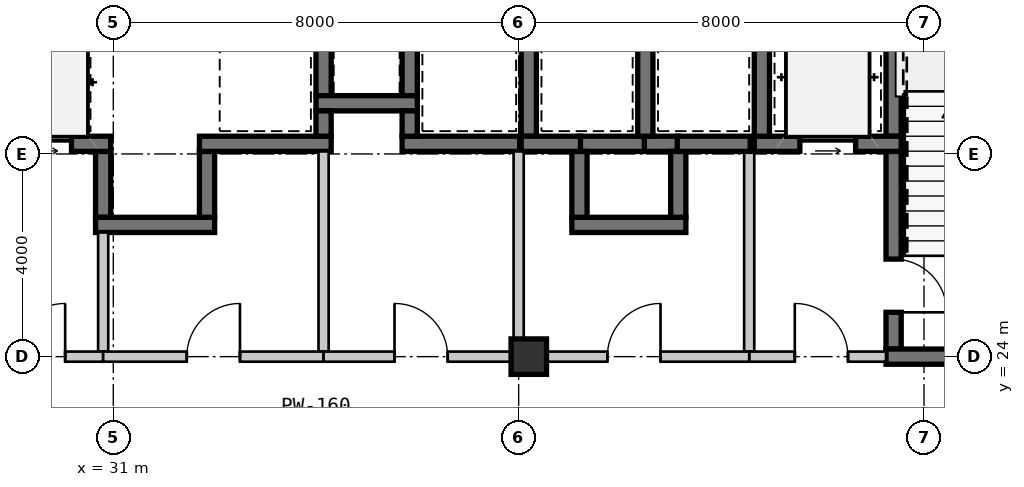
"""IFC4 building model, lengths in metres.
Left out: names, types, materials, properties, quantities, classifications, styles, units other than length and angle.
Written with IfcOpenShell. Run it as: python <this file> out.ifc"""

import sys

from ifc_helpers import new_model, si_unit, direction, frame, frame_2d, origin, origin_2d, place, context, subcontext, project, spatial, rectangle, extrude, source, transform, mapped, element, fill, save


model = new_model("IFC4")
c1 = context("Model", 3, precision=1e-05, world=origin(), true_north=direction((0.0, 1.0)))
c2 = subcontext(c1, "Body", "Model", "MODEL_VIEW")
j1 = project(units=[si_unit("LENGTHUNIT", "METRE"), si_unit("PLANEANGLEUNIT", "RADIAN")], contexts=[c1])
p1 = place(None, origin())
s1 = spatial("IfcSite", under=j1, at=p1, CompositionType="ELEMENT")
p2 = place(p1, origin())
s2 = spatial("IfcBuilding", under=s1, at=p2, CompositionType="ELEMENT")
p3 = place(p2, frame((0.0, 0.0, 93.45)))
s3 = spatial("IfcBuildingStorey", under=s2, at=p3, CompositionType="ELEMENT", Elevation=93.45)
m1 = source(origin(), c2, "Body", "SweptSolid", [
    extrude(rectangle(XDim=0.7, YDim=0.7, at=origin_2d()), origin(), (0.0, 0.0, 1.0), 3.15),
])
p4 = place(p3, frame((39.2, 24.0, 0.0), z_axis=(0.0, 0.0, 1.0), x_axis=(1.0, 0.0, 0.0)))
e1 = element("IfcColumn", 1, at=p4, inside=s3, PredefinedType="COLUMN", context=c2, shape_type="MappedRepresentation", body=[
    mapped(m1, transform((0.0, 0.0, 0.0), scale=1.0)),
])
m2 = source(origin(), c2, "Body", "SweptSolid", [
    extrude(rectangle(XDim=3.5, YDim=0.3, at=frame_2d((1.75, 0.0))), origin(), (0.0, 0.0, 1.0), 2.93),
])
p5 = place(p3, frame((46.4, 31.85, 0.0), z_axis=(0.0, 0.0, 1.0), x_axis=(0.0, -1.0, 0.0)))
e2 = element("IfcWall", 2, at=p5, inside=s3, PredefinedType="SHEAR", context=c2, shape_type="MappedRepresentation", body=[
    mapped(m2, transform((0.0, 0.0, 0.0), scale=1.0)),
])
m3 = source(origin(), c2, "Body", "SweptSolid", [
    extrude(rectangle(XDim=3.9, YDim=0.3, at=frame_2d((1.95, 0.0))), origin(), (0.0, 0.0, 1.0), 2.93),
])
p6 = place(p3, frame((46.4, 28.05, 0.0), z_axis=(0.0, 0.0, 1.0), x_axis=(0.0, -1.0, 0.0)))
e3 = element("IfcWall", 3, at=p6, inside=s3, PredefinedType="SHEAR", context=c2, shape_type="MappedRepresentation", body=[
    mapped(m3, transform((0.0, 0.0, 0.0), scale=1.0)),
])
m4 = source(origin(), c2, "Body", "SweptSolid", [
    extrude(rectangle(XDim=1.05, YDim=2.1, at=frame_2d((0.525, 1.05))), frame((0.0, 0.16, 0.0), z_axis=(0.0, -1.0, 0.0), x_axis=(1.0, 0.0, 0.0)), (0.0, 0.0, 1.0), 0.32),
])
p7 = place(p6, frame((2.125, 0.0, 0.0)))
e4 = element("IfcOpeningElement", 4, at=p7, cuts=e3, PredefinedType="OPENING", context=c2, shape_type="MappedRepresentation", body=[
    mapped(m4, transform((0.0, 0.0, 0.0), scale=1.0)),
])
m5 = source(origin(), c2, "Body", "SweptSolid", [
    extrude(rectangle(XDim=4.9, YDim=0.3, at=frame_2d((2.45, 0.0))), origin(), (0.0, 0.0, 1.0), 2.93),
])
p8 = place(p3, frame((46.25, 24.0, 0.0), z_axis=(0.0, 0.0, 1.0), x_axis=(1.0, 0.0, 0.0)))
e5 = element("IfcWall", 5, at=p8, inside=s3, PredefinedType="SHEAR", context=c2, shape_type="MappedRepresentation", body=[
    mapped(m5, transform((0.0, 0.0, 0.0), scale=1.0)),
])
m6 = source(origin(), c2, "Body", "SweptSolid", [
    extrude(rectangle(XDim=2.9, YDim=0.3, at=frame_2d((1.45, 0.0))), origin(), (0.0, 0.0, 1.0), 2.93),
])
p9 = place(p3, frame((43.65, 28.2, 0.0), z_axis=(0.0, 0.0, 1.0), x_axis=(1.0, 0.0, 0.0)))
e6 = element("IfcWall", 6, at=p9, inside=s3, PredefinedType="SHEAR", context=c2, shape_type="MappedRepresentation", body=[
    mapped(m6, transform((0.0, 0.0, 0.0), scale=1.0)),
])
m7 = source(origin(), c2, "Body", "SweptSolid", [
    extrude(rectangle(XDim=1.1, YDim=2.15, at=frame_2d((0.55, 1.075))), frame((0.0, 0.16, 0.0), z_axis=(0.0, -1.0, 0.0), x_axis=(1.0, 0.0, 0.0)), (0.0, 0.0, 1.0), 0.32),
])
p10 = place(p9, frame((0.9, 0.0, 0.0)))
e7 = element("IfcOpeningElement", 7, at=p10, cuts=e6, PredefinedType="OPENING", context=c2, shape_type="MappedRepresentation", body=[
    mapped(m7, transform((0.0, 0.0, 0.0), scale=1.0)),
])
p11 = place(p3, frame((43.8, 31.85, 0.0), z_axis=(0.0, 0.0, 1.0), x_axis=(0.0, -1.0, 0.0)))
e8 = element("IfcWall", 8, at=p11, inside=s3, PredefinedType="SHEAR", context=c2, shape_type="MappedRepresentation", body=[
    mapped(m2, transform((0.0, 0.0, 0.0), scale=1.0)),
])
m8 = source(origin(), c2, "Body", "SweptSolid", [
    extrude(rectangle(XDim=3.95, YDim=0.2, at=frame_2d((1.975, 0.0))), origin(), (0.0, 0.0, 1.0), 2.93),
])
p12 = place(p3, frame((43.55, 28.05, 0.0), z_axis=(0.0, 0.0, 1.0), x_axis=(0.0, -1.0, 0.0)))
e9 = element("IfcWall", 9, at=p12, inside=s3, PredefinedType="SOLIDWALL", context=c2, shape_type="MappedRepresentation", body=[
    mapped(m8, transform((0.0, 0.0, 0.0), scale=1.0)),
])
m9 = source(origin(), c2, "Body", "SweptSolid", [
    extrude(rectangle(XDim=2.7, YDim=0.2, at=frame_2d((1.35, 0.0))), origin(), (0.0, 0.0, 1.0), 2.397),
])
p13 = place(p3, frame((43.55, 24.0, 0.0), z_axis=(0.0, 0.0, 1.0), x_axis=(1.0, 0.0, 0.0)))
e10 = element("IfcWall", 10, at=p13, inside=s3, PredefinedType="SOLIDWALL", context=c2, shape_type="MappedRepresentation", body=[
    mapped(m9, transform((0.0, 0.0, 0.0), scale=1.0)),
])
m10 = source(origin(), c2, "Body", "SweptSolid", [
    extrude(rectangle(XDim=1.05, YDim=2.1, at=frame_2d((0.525, 1.05))), frame((0.0, 0.11, 0.0), z_axis=(0.0, -1.0, 0.0), x_axis=(1.0, 0.0, 0.0)), (0.0, 0.0, 1.0), 0.22),
])
p14 = place(p13, frame((0.9, 0.0, 0.0)))
e11 = element("IfcOpeningElement", 11, at=p14, cuts=e10, PredefinedType="OPENING", context=c2, shape_type="MappedRepresentation", body=[
    mapped(m10, transform((0.0, 0.0, 0.0), scale=1.0)),
])
m11 = source(origin(), c2, "Body", "SweptSolid", [
    extrude(rectangle(XDim=1.2, YDim=0.3, at=frame_2d((0.6, 0.0))), origin(), (0.0, 0.0, 1.0), 2.93),
])
for number, where, z_axis, x_axis in (
    (12, (35.15, 30.35, 0.0), (0.0, 0.0, 1.0), (0.0, -1.0, 0.0)),
    (13, (36.85, 29.15, 0.0), (0.0, 0.0, 1.0), (0.0, 1.0, 0.0)),
):
    element("IfcWall", number, at=place(p3, frame(where, z_axis=z_axis, x_axis=x_axis)), inside=s3, PredefinedType="SHEAR", context=c2, shape_type="MappedRepresentation", body=[
        mapped(m11, transform((0.0, 0.0, 0.0), scale=1.0)),
    ])
m12 = source(origin(), c2, "Body", "SweptSolid", [
    extrude(rectangle(XDim=2.0, YDim=0.3, at=frame_2d((1.0, 0.0))), origin(), (0.0, 0.0, 1.0), 2.93),
])
p15 = place(p3, frame((35.0, 29.0, 0.0), z_axis=(0.0, 0.0, 1.0), x_axis=(1.0, 0.0, 0.0)))
e14 = element("IfcWall", 14, at=p15, inside=s3, PredefinedType="SHEAR", context=c2, shape_type="MappedRepresentation", body=[
    mapped(m12, transform((0.0, 0.0, 0.0), scale=1.0)),
])
m13 = source(origin(), c2, "Body", "SweptSolid", [
    extrude(rectangle(XDim=1.3, YDim=0.3, at=frame_2d((0.65, 0.0))), origin(), (0.0, 0.0, 1.0), 2.93),
])
p16 = place(p3, frame((30.8, 28.05, 0.0), z_axis=(0.0, 0.0, 1.0), x_axis=(0.0, -1.0, 0.0)))
e15 = element("IfcWall", 15, at=p16, inside=s3, PredefinedType="SHEAR", context=c2, shape_type="MappedRepresentation", body=[
    mapped(m13, transform((0.0, 0.0, 0.0), scale=1.0)),
])
m14 = source(origin(), c2, "Body", "SweptSolid", [
    extrude(rectangle(XDim=2.35, YDim=0.3, at=frame_2d((1.175, 0.0))), origin(), (0.0, 0.0, 1.0), 2.93),
])
p17 = place(p3, frame((30.65, 26.6, 0.0), z_axis=(0.0, 0.0, 1.0), x_axis=(1.0, 0.0, 0.0)))
e16 = element("IfcWall", 16, at=p17, inside=s3, PredefinedType="SHEAR", context=c2, shape_type="MappedRepresentation", body=[
    mapped(m14, transform((0.0, 0.0, 0.0), scale=1.0)),
])
p18 = place(p3, frame((32.85, 26.75, 0.0), z_axis=(0.0, 0.0, 1.0), x_axis=(0.0, 1.0, 0.0)))
e17 = element("IfcWall", 17, at=p18, inside=s3, PredefinedType="SHEAR", context=c2, shape_type="MappedRepresentation", body=[
    mapped(m13, transform((0.0, 0.0, 0.0), scale=1.0)),
])
m15 = source(origin(), c2, "Body", "SweptSolid", [
    extrude(rectangle(XDim=1.32, YDim=0.3, at=frame_2d((0.66, 0.0))), origin(), (0.0, 0.0, 1.0), 2.93),
])
p19 = place(p3, frame((41.52, 28.2, 0.0), z_axis=(0.0, 0.0, 1.0), x_axis=(-1.0, 0.0, 0.0)))
e18 = element("IfcWall", 18, at=p19, inside=s3, PredefinedType="SHEAR", context=c2, shape_type="MappedRepresentation", body=[
    mapped(m15, transform((0.0, 0.0, 0.0), scale=1.0)),
])
m16 = source(origin(), c2, "Body", "SweptSolid", [
    extrude(rectangle(XDim=0.67, YDim=0.3, at=frame_2d((0.335, 0.0))), origin(), (0.0, 0.0, 1.0), 2.93),
])
p20 = place(p3, frame((42.15, 28.2, 0.0), z_axis=(0.0, 0.0, 1.0), x_axis=(-1.0, 0.0, 0.0)))
e19 = element("IfcWall", 19, at=p20, inside=s3, PredefinedType="SHEAR", context=c2, shape_type="MappedRepresentation", body=[
    mapped(m16, transform((0.0, 0.0, 0.0), scale=1.0)),
])
m17 = source(origin(), c2, "Body", "SweptSolid", [
    extrude(rectangle(XDim=2.25, YDim=0.3, at=frame_2d((1.125, 0.0))), origin(), (0.0, 0.0, 1.0), 2.93),
])
p21 = place(p3, frame((40.05, 26.6, 0.0), z_axis=(0.0, 0.0, 1.0), x_axis=(1.0, 0.0, 0.0)))
e20 = element("IfcWall", 20, at=p21, inside=s3, PredefinedType="SHEAR", context=c2, shape_type="MappedRepresentation", body=[
    mapped(m17, transform((0.0, 0.0, 0.0), scale=1.0)),
])
for number, where, z_axis, x_axis in (
    (21, (40.2, 28.05, 0.0), (0.0, 0.0, 1.0), (0.0, -1.0, 0.0)),
    (22, (42.15, 26.75, 0.0), (0.0, 0.0, 1.0), (0.0, 1.0, 0.0)),
):
    element("IfcWall", number, at=place(p3, frame(where, z_axis=z_axis, x_axis=x_axis)), inside=s3, PredefinedType="SHEAR", context=c2, shape_type="MappedRepresentation", body=[
        mapped(m13, transform((0.0, 0.0, 0.0), scale=1.0)),
    ])
m18 = source(origin(), c2, "Body", "SweptSolid", [
    extrude(rectangle(XDim=2.45, YDim=0.3, at=frame_2d((1.225, 0.0))), origin(), (0.0, 0.0, 1.0), 2.93),
])
p22 = place(p3, frame((28.5, 28.2, 0.0), z_axis=(0.0, 0.0, 1.0), x_axis=(1.0, 0.0, 0.0)))
e23 = element("IfcWall", 23, at=p22, inside=s3, PredefinedType="SHEAR", context=c2, shape_type="MappedRepresentation", body=[
    mapped(m18, transform((0.0, 0.0, 0.0), scale=1.0)),
])
m19 = source(origin(), c2, "Body", "SweptSolid", [
    extrude(rectangle(XDim=1.05, YDim=2.15, at=frame_2d((0.525, 1.075))), frame((0.0, 0.16, 0.0), z_axis=(0.0, -1.0, 0.0), x_axis=(1.0, 0.0, 0.0)), (0.0, 0.0, 1.0), 0.32),
])
p23 = place(p22, frame((0.625, 0.0, 0.0)))
e24 = element("IfcOpeningElement", 24, at=p23, cuts=e23, PredefinedType="OPENING", context=c2, shape_type="MappedRepresentation", body=[
    mapped(m19, transform((0.0, 0.0, 0.0), scale=1.0)),
])
m20 = source(origin(), c2, "Body", "SweptSolid", [
    extrude(rectangle(XDim=2.35, YDim=0.2, at=frame_2d((1.175, 0.0))), origin(), (0.0, 0.0, 1.0), 2.93),
])
p24 = place(p3, frame((30.8, 26.45, 0.0), z_axis=(0.0, 0.0, 1.0), x_axis=(0.0, -1.0, 0.0)))
e25 = element("IfcWall", 25, at=p24, inside=s3, PredefinedType="SOLIDWALL", context=c2, shape_type="MappedRepresentation", body=[
    mapped(m20, transform((0.0, 0.0, 0.0), scale=1.0)),
])
m21 = source(origin(), c2, "Body", "SweptSolid", [
    extrude(rectangle(XDim=4.35, YDim=0.2, at=frame_2d((2.175, 0.0))), origin(), (0.0, 0.0, 1.0), 2.47),
])
p25 = place(p3, frame((30.8, 24.0, 0.0), z_axis=(0.0, 0.0, 1.0), x_axis=(-1.0, 0.0, 0.0)))
e26 = element("IfcWall", 26, at=p25, inside=s3, PredefinedType="SOLIDWALL", context=c2, shape_type="MappedRepresentation", body=[
    mapped(m21, transform((0.0, 0.0, 0.0), scale=1.0)),
])
p26 = place(p25, frame((0.75, 0.0, 0.0)))
e27 = element("IfcOpeningElement", 27, at=p26, cuts=e26, PredefinedType="OPENING", context=c2, shape_type="MappedRepresentation", body=[
    mapped(m10, transform((0.0, 0.0, 0.0), scale=1.0)),
])
m22 = source(origin(), c2, "Body", "SweptSolid", [
    extrude(rectangle(XDim=2.6, YDim=0.3, at=frame_2d((1.3, 0.0))), origin(), (0.0, 0.0, 1.0), 2.93),
])
p27 = place(p3, frame((32.7, 28.2, 0.0), z_axis=(0.0, 0.0, 1.0), x_axis=(1.0, 0.0, 0.0)))
e28 = element("IfcWall", 28, at=p27, inside=s3, PredefinedType="SHEAR", context=c2, shape_type="MappedRepresentation", body=[
    mapped(m22, transform((0.0, 0.0, 0.0), scale=1.0)),
])
m23 = source(origin(), c2, "Body", "SweptSolid", [
    extrude(rectangle(XDim=0.5, YDim=0.3, at=frame_2d((0.25, 0.0))), origin(), (0.0, 0.0, 1.0), 2.93),
])
p28 = place(p3, frame((35.15, 28.35, 0.0), z_axis=(0.0, 0.0, 1.0), x_axis=(0.0, 1.0, 0.0)))
e29 = element("IfcWall", 29, at=p28, inside=s3, PredefinedType="SHEAR", context=c2, shape_type="MappedRepresentation", body=[
    mapped(m23, transform((0.0, 0.0, 0.0), scale=1.0)),
])
p29 = place(p3, frame((39.2, 28.35, 0.0), z_axis=(0.0, 0.0, 1.0), x_axis=(0.0, 1.0, 0.0)))
e30 = element("IfcWall", 30, at=p29, inside=s3, PredefinedType="SHEAR", context=c2, shape_type="MappedRepresentation", body=[
    mapped(m2, transform((0.0, 0.0, 0.0), scale=1.0)),
])
m24 = source(origin(), c2, "Body", "SweptSolid", [
    extrude(rectangle(XDim=2.32, YDim=0.3, at=frame_2d((1.16, 0.0))), origin(), (0.0, 0.0, 1.0), 2.93),
])
p30 = place(p3, frame((36.7, 28.2, 0.0), z_axis=(0.0, 0.0, 1.0), x_axis=(1.0, 0.0, 0.0)))
e31 = element("IfcWall", 31, at=p30, inside=s3, PredefinedType="SHEAR", context=c2, shape_type="MappedRepresentation", body=[
    mapped(m24, transform((0.0, 0.0, 0.0), scale=1.0)),
])
p31 = place(p3, frame((36.85, 28.85, 0.0), z_axis=(0.0, 0.0, 1.0), x_axis=(0.0, -1.0, 0.0)))
e32 = element("IfcWall", 32, at=p31, inside=s3, PredefinedType="SHEAR", context=c2, shape_type="MappedRepresentation", body=[
    mapped(m23, transform((0.0, 0.0, 0.0), scale=1.0)),
])
p32 = place(p3, frame((41.5, 28.35, 0.0), z_axis=(0.0, 0.0, 1.0), x_axis=(0.0, 1.0, 0.0)))
e33 = element("IfcWall", 33, at=p32, inside=s3, PredefinedType="SHEAR", context=c2, shape_type="MappedRepresentation", body=[
    mapped(m2, transform((0.0, 0.0, 0.0), scale=1.0)),
])
m25 = source(origin(), c2, "Body", "SweptSolid", [
    extrude(rectangle(XDim=1.17, YDim=0.3, at=frame_2d((0.585, 0.0))), origin(), (0.0, 0.0, 1.0), 2.93),
])
p33 = place(p3, frame((39.05, 28.2, 0.0), z_axis=(0.0, 0.0, 1.0), x_axis=(1.0, 0.0, 0.0)))
e34 = element("IfcWall", 34, at=p33, inside=s3, PredefinedType="SHEAR", context=c2, shape_type="MappedRepresentation", body=[
    mapped(m25, transform((0.0, 0.0, 0.0), scale=1.0)),
])
m26 = source(origin(), c2, "Body", "SweptSolid", [
    extrude(rectangle(XDim=1.44, YDim=0.3, at=frame_2d((0.72, 0.0))), origin(), (0.0, 0.0, 1.0), 2.93),
])
p34 = place(p3, frame((42.13, 28.2, 0.0), z_axis=(0.0, 0.0, 1.0), x_axis=(1.0, 0.0, 0.0)))
e35 = element("IfcWall", 35, at=p34, inside=s3, PredefinedType="SHEAR", context=c2, shape_type="MappedRepresentation", body=[
    mapped(m26, transform((0.0, 0.0, 0.0), scale=1.0)),
])
p35 = place(p3, frame((35.15, 28.05, 0.0), z_axis=(0.0, 0.0, 1.0), x_axis=(0.0, -1.0, 0.0)))
e36 = element("IfcWall", 36, at=p35, inside=s3, PredefinedType="SOLIDWALL", context=c2, shape_type="MappedRepresentation", body=[
    mapped(m8, transform((0.0, 0.0, 0.0), scale=1.0)),
])
m27 = source(origin(), c2, "Body", "SweptSolid", [
    extrude(rectangle(XDim=4.35, YDim=0.2, at=frame_2d((2.175, 0.0))), origin(), (0.0, 0.0, 1.0), 2.47),
])
p36 = place(p3, frame((35.15, 24.0, 0.0), z_axis=(0.0, 0.0, 1.0), x_axis=(-1.0, 0.0, 0.0)))
e37 = element("IfcWall", 37, at=p36, inside=s3, PredefinedType="SOLIDWALL", context=c2, shape_type="MappedRepresentation", body=[
    mapped(m27, transform((0.0, 0.0, 0.0), scale=1.0)),
])
p37 = place(p36, frame((1.65, 0.0, 0.0)))
e38 = element("IfcOpeningElement", 38, at=p37, cuts=e37, PredefinedType="OPENING", context=c2, shape_type="MappedRepresentation", body=[
    mapped(m10, transform((0.0, 0.0, 0.0), scale=1.0)),
])
p38 = place(p3, frame((39.0, 28.05, 0.0), z_axis=(0.0, 0.0, 1.0), x_axis=(0.0, -1.0, 0.0)))
e39 = element("IfcWall", 39, at=p38, inside=s3, PredefinedType="SOLIDWALL", context=c2, shape_type="MappedRepresentation", body=[
    mapped(m8, transform((0.0, 0.0, 0.0), scale=1.0)),
])
m28 = source(origin(), c2, "Body", "SweptSolid", [
    extrude(rectangle(XDim=3.85, YDim=0.2, at=frame_2d((1.925, 0.0))), origin(), (0.0, 0.0, 1.0), 2.47),
])
p39 = place(p3, frame((39.0, 24.0, 0.0), z_axis=(0.0, 0.0, 1.0), x_axis=(-1.0, 0.0, 0.0)))
e40 = element("IfcWall", 40, at=p39, inside=s3, PredefinedType="SOLIDWALL", context=c2, shape_type="MappedRepresentation", body=[
    mapped(m28, transform((0.0, 0.0, 0.0), scale=1.0)),
])
p40 = place(p39, frame((1.4, 0.0, 0.0)))
e41 = element("IfcOpeningElement", 41, at=p40, cuts=e40, PredefinedType="OPENING", context=c2, shape_type="MappedRepresentation", body=[
    mapped(m10, transform((0.0, 0.0, 0.0), scale=1.0)),
])
m29 = source(origin(), c2, "Body", "SweptSolid", [
    extrude(rectangle(XDim=4.55, YDim=0.2, at=frame_2d((2.275, 0.0))), origin(), (0.0, 0.0, 1.0), 2.397),
])
p41 = place(p3, frame((43.55, 24.0, 0.0), z_axis=(0.0, 0.0, 1.0), x_axis=(-1.0, 0.0, 0.0)))
e42 = element("IfcWall", 42, at=p41, inside=s3, PredefinedType="SOLIDWALL", context=c2, shape_type="MappedRepresentation", body=[
    mapped(m29, transform((0.0, 0.0, 0.0), scale=1.0)),
])
p42 = place(p41, frame((1.75, 0.0, 0.0)))
e43 = element("IfcOpeningElement", 43, at=p42, cuts=e42, PredefinedType="OPENING", context=c2, shape_type="MappedRepresentation", body=[
    mapped(m10, transform((0.0, 0.0, 0.0), scale=1.0)),
])
m30 = source(origin(), c2, "Body", "SweptSolid", [
    extrude(rectangle(XDim=1.05, YDim=2.1, at=frame_2d((0.525, 1.05))), frame((0.0, 0.025, 0.0), z_axis=(0.0, -1.0, 0.0), x_axis=(1.0, 0.0, 0.0)), (0.0, 0.0, 1.0), 0.05),
])
p43 = place(p7, origin())
e44 = element("IfcDoor", 44, at=p43, inside=s3, OperationType="SINGLE_SWING_RIGHT", PredefinedType="DOOR", context=c2, shape_type="MappedRepresentation", body=[
    mapped(m30, transform((0.0, 0.0, 0.0), scale=1.0)),
])
fill(e4, e44)
m31 = source(origin(), c2, "Body", "SweptSolid", [
    extrude(rectangle(XDim=1.1, YDim=2.15, at=frame_2d((0.55, 1.075))), frame((0.0, 0.025, 0.0), z_axis=(0.0, -1.0, 0.0), x_axis=(1.0, 0.0, 0.0)), (0.0, 0.0, 1.0), 0.05),
])
p44 = place(p10, origin())
e45 = element("IfcDoor", 45, at=p44, inside=s3, OperationType="SLIDING_TO_LEFT", PredefinedType="DOOR", context=c2, shape_type="MappedRepresentation", body=[
    mapped(m31, transform((0.0, 0.0, 0.0), scale=1.0)),
])
fill(e7, e45)
p45 = place(p14, origin())
e46 = element("IfcDoor", 46, at=p45, inside=s3, OperationType="SINGLE_SWING_LEFT", PredefinedType="DOOR", context=c2, shape_type="MappedRepresentation", body=[
    mapped(m30, transform((0.0, 0.0, 0.0), scale=1.0)),
])
fill(e11, e46)
m32 = source(origin(), c2, "Body", "SweptSolid", [
    extrude(rectangle(XDim=1.05, YDim=2.15, at=frame_2d((0.525, 1.075))), frame((0.0, 0.025, 0.0), z_axis=(0.0, -1.0, 0.0), x_axis=(1.0, 0.0, 0.0)), (0.0, 0.0, 1.0), 0.05),
])
p46 = place(p23, origin())
e47 = element("IfcDoor", 47, at=p46, inside=s3, OperationType="SLIDING_TO_LEFT", PredefinedType="DOOR", context=c2, shape_type="MappedRepresentation", body=[
    mapped(m32, transform((0.0, 0.0, 0.0), scale=1.0)),
])
fill(e24, e47)
p47 = place(p26, frame((1.05, 0.0, 0.0), z_axis=(0.0, 0.0, 1.0), x_axis=(-1.0, 0.0, 0.0)))
e48 = element("IfcDoor", 48, at=p47, inside=s3, OperationType="SINGLE_SWING_RIGHT", PredefinedType="DOOR", context=c2, shape_type="MappedRepresentation", body=[
    mapped(m30, transform((0.0, 0.0, 0.0), scale=1.0)),
])
fill(e27, e48)
p48 = place(p37, frame((1.05, 0.0, 0.0), z_axis=(0.0, 0.0, 1.0), x_axis=(-1.0, 0.0, 0.0)))
e49 = element("IfcDoor", 49, at=p48, inside=s3, OperationType="SINGLE_SWING_RIGHT", PredefinedType="DOOR", context=c2, shape_type="MappedRepresentation", body=[
    mapped(m30, transform((0.0, 0.0, 0.0), scale=1.0)),
])
fill(e38, e49)
p49 = place(p40, frame((1.05, 0.0, 0.0), z_axis=(0.0, 0.0, 1.0), x_axis=(-1.0, 0.0, 0.0)))
e50 = element("IfcDoor", 50, at=p49, inside=s3, OperationType="SINGLE_SWING_LEFT", PredefinedType="DOOR", context=c2, shape_type="MappedRepresentation", body=[
    mapped(m30, transform((0.0, 0.0, 0.0), scale=1.0)),
])
fill(e41, e50)
p50 = place(p42, frame((1.05, 0.0, 0.0), z_axis=(0.0, 0.0, 1.0), x_axis=(-1.0, 0.0, 0.0)))
e51 = element("IfcDoor", 51, at=p50, inside=s3, OperationType="SINGLE_SWING_RIGHT", PredefinedType="DOOR", context=c2, shape_type="MappedRepresentation", body=[
    mapped(m30, transform((0.0, 0.0, 0.0), scale=1.0)),
])
fill(e43, e51)
save(model, sys.argv[1])
